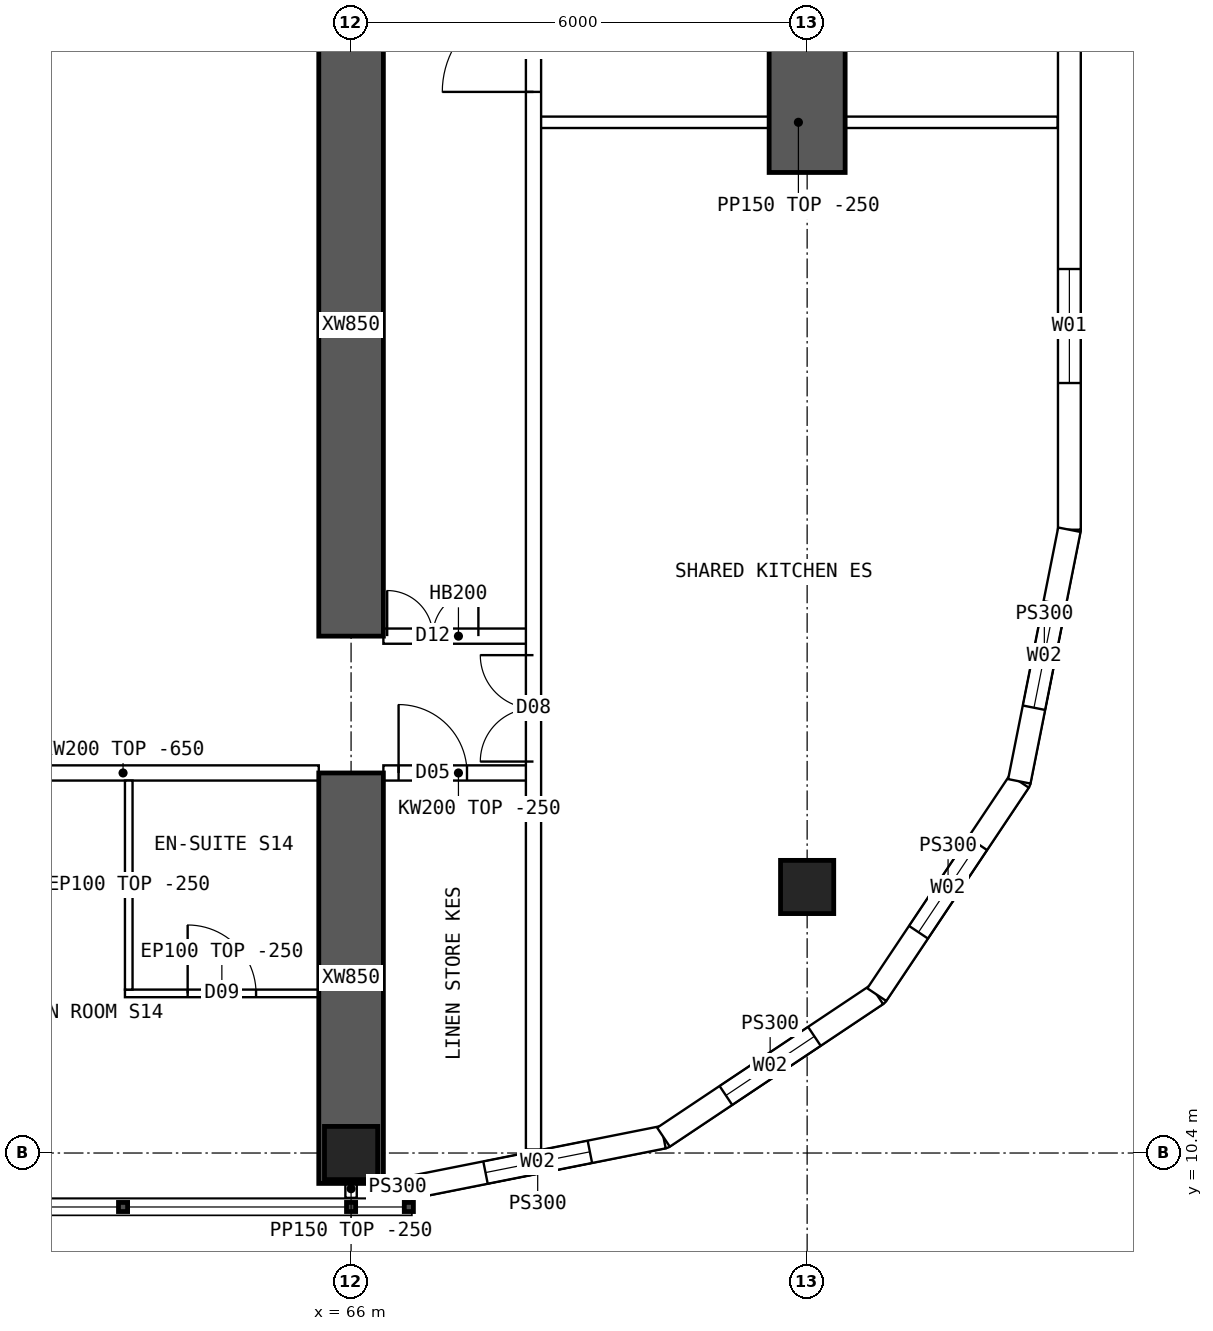
"""IFC4 building model, lengths in metres.
Left out: names, types, materials, properties, quantities, classifications, styles, units other than length and angle.
Written with IfcOpenShell. Run it as: python <this file> out.ifc"""

import sys

from ifc_helpers import new_model, si_unit, direction, frame, frame_2d, origin, origin_2d, place, context, subcontext, project, spatial, polyline, rectangle, hollow_rectangle, outline, extrude, element, fill, save


model = new_model("IFC4")
c1 = context("Model", 3, precision=1e-05, world=origin(), true_north=direction((0.0, 1.0)))
c2 = subcontext(c1, "Body", "Model", "MODEL_VIEW")
j1 = project(units=[si_unit("LENGTHUNIT", "METRE"), si_unit("PLANEANGLEUNIT", "RADIAN")], contexts=[c1])
p1 = place(None, origin())
s1 = spatial("IfcSite", under=j1, at=p1, CompositionType="ELEMENT")
p2 = place(p1, origin())
s2 = spatial("IfcBuilding", under=s1, at=p2, CompositionType="ELEMENT")
p3 = place(p2, frame((0.0, 0.0, 167.35)))
s3 = spatial("IfcBuildingStorey", under=s2, at=p3, CompositionType="ELEMENT", Elevation=167.35)
for number, where, z_axis, x_axis in (
    (1, (66.0, 10.4, 0.0), (0.0, 0.0, 1.0), (1.0, 0.0, 0.0)),
    (2, (72.0, 13.9, 0.0), (0.0, 0.0, 1.0), (1.0, 0.0, 0.0)),
):
    element("IfcColumn", number, at=place(p3, frame(where, z_axis=z_axis, x_axis=x_axis)), inside=s3, PredefinedType="COLUMN", context=c2, shape_type="SweptSolid", body=[
        extrude(hollow_rectangle(XDim=0.7, YDim=0.7, WallThickness=0.07, at=origin_2d()), origin(), (0.0, 0.0, 1.0), 3.75),
    ])
p4 = place(p3, frame((72.0, 23.3, 0.0), z_axis=(0.0, 0.0, 1.0), x_axis=(0.0, 1.0, 0.0)))
e3 = element("IfcWall", 3, at=p4, inside=s3, PredefinedType="SHEAR", context=c2, shape_type="SweptSolid", body=[
    extrude(rectangle(XDim=5.0, YDim=1.0, at=frame_2d((2.5, 0.0))), origin(), (0.0, 0.0, 1.0), 3.75),
])
p5 = place(p3, frame((66.0, 10.0, 0.0), z_axis=(0.0, 0.0, 1.0), x_axis=(0.0, 1.0, 0.0)))
e4 = element("IfcWall", 4, at=p5, inside=s3, PredefinedType="SHEAR", context=c2, shape_type="SweptSolid", body=[
    extrude(rectangle(XDim=5.4, YDim=0.85, at=frame_2d((2.7, 0.0))), origin(), (0.0, 0.0, 1.0), 3.75),
])
p6 = place(p3, frame((66.0, 17.2, 0.0), z_axis=(0.0, 0.0, 1.0), x_axis=(0.0, 1.0, 0.0)))
e5 = element("IfcWall", 5, at=p6, inside=s3, PredefinedType="SHEAR", context=c2, shape_type="SweptSolid", body=[
    extrude(rectangle(XDim=8.175, YDim=0.85, at=frame_2d((4.087, 0.0))), origin(), (0.0, 0.0, 1.0), 3.75),
])
p7 = place(p3, frame((75.45, 18.6, 0.0), z_axis=(0.0, 0.0, 1.0), x_axis=(0.0, 1.0, 0.0)))
e6 = element("IfcWall", 6, at=p7, inside=s3, PredefinedType="SOLIDWALL", context=c2, shape_type="SweptSolid", body=[
    extrude(outline(polyline([(-0.015, -0.15), (26.815, -0.15), (26.785, 0.15), (0.015, 0.15), (-0.015, -0.15)])), origin(), (0.0, 0.0, 1.0), 3.5),
])
p8 = place(p7, frame((1.93, 0.0, 0.9)))
e7 = element("IfcOpeningElement", 7, at=p8, cuts=e6, PredefinedType="OPENING", context=c2, shape_type="SweptSolid", body=[
    extrude(rectangle(XDim=1.5, YDim=2.0, at=frame_2d((0.75, 1.0))), frame((0.0, 0.16, 0.0), z_axis=(0.0, -1.0, 0.0), x_axis=(1.0, 0.0, 0.0)), (0.0, 0.0, 1.0), 0.32),
])
p9 = place(p7, frame((7.29, 0.0, 0.9)))
e8 = element("IfcOpeningElement", 8, at=p9, cuts=e6, PredefinedType="OPENING", context=c2, shape_type="SweptSolid", body=[
    extrude(rectangle(XDim=1.5, YDim=2.0, at=frame_2d((0.75, 1.0))), frame((0.0, 0.16, 0.0), z_axis=(0.0, -1.0, 0.0), x_axis=(1.0, 0.0, 0.0)), (0.0, 0.0, 1.0), 0.32),
])
p10 = place(p7, frame((12.65, 0.0, 0.9)))
e9 = element("IfcOpeningElement", 9, at=p10, cuts=e6, PredefinedType="OPENING", context=c2, shape_type="SweptSolid", body=[
    extrude(rectangle(XDim=1.5, YDim=2.0, at=frame_2d((0.75, 1.0))), frame((0.0, 0.16, 0.0), z_axis=(0.0, -1.0, 0.0), x_axis=(1.0, 0.0, 0.0)), (0.0, 0.0, 1.0), 0.32),
])
p11 = place(p7, frame((18.01, 0.0, 0.9)))
e10 = element("IfcOpeningElement", 10, at=p11, cuts=e6, PredefinedType="OPENING", context=c2, shape_type="SweptSolid", body=[
    extrude(rectangle(XDim=1.5, YDim=2.0, at=frame_2d((0.75, 1.0))), frame((0.0, 0.16, 0.0), z_axis=(0.0, -1.0, 0.0), x_axis=(1.0, 0.0, 0.0)), (0.0, 0.0, 1.0), 0.32),
])
p12 = place(p7, frame((23.37, 0.0, 0.9)))
e11 = element("IfcOpeningElement", 11, at=p12, cuts=e6, PredefinedType="OPENING", context=c2, shape_type="SweptSolid", body=[
    extrude(rectangle(XDim=1.5, YDim=2.0, at=frame_2d((0.75, 1.0))), frame((0.0, 0.16, 0.0), z_axis=(0.0, -1.0, 0.0), x_axis=(1.0, 0.0, 0.0)), (0.0, 0.0, 1.0), 0.32),
])
p13 = place(p3, frame((66.8, 9.95, 0.0), z_axis=(0.0, 0.0, 1.0), x_axis=(0.98078325777, 0.195100490205, 0.0)))
e12 = element("IfcWall", 12, at=p13, inside=s3, PredefinedType="SOLIDWALL", context=c2, shape_type="SweptSolid", body=[
    extrude(outline(polyline([(-0.03, -0.15), (3.405, -0.15), (3.345, 0.15), (0.03, 0.15), (-0.03, -0.15)])), origin(), (0.0, 0.0, 1.0), 3.5),
])
p14 = place(p13, frame((0.988, 0.0, 0.9)))
e13 = element("IfcOpeningElement", 13, at=p14, cuts=e12, PredefinedType="OPENING", context=c2, shape_type="SweptSolid", body=[
    extrude(rectangle(XDim=1.4, YDim=1.8, at=frame_2d((0.7, 0.9))), frame((0.0, 0.16, 0.0), z_axis=(0.0, -1.0, 0.0), x_axis=(1.0, 0.0, 0.0)), (0.0, 0.0, 1.0), 0.32),
])
p15 = place(p3, frame((70.11, 10.608, 0.0), z_axis=(0.0, 0.0, 1.0), x_axis=(0.831493450887, 0.555534554399, 0.0)))
e14 = element("IfcWall", 14, at=p15, inside=s3, PredefinedType="SOLIDWALL", context=c2, shape_type="SweptSolid", body=[
    extrude(outline(polyline([(-0.03, -0.15), (3.405, -0.15), (3.345, 0.15), (0.03, 0.15), (-0.03, -0.15)])), origin(), (0.0, 0.0, 1.0), 3.5),
])
p16 = place(p15, frame((0.988, 0.0, 0.9)))
e15 = element("IfcOpeningElement", 15, at=p16, cuts=e14, PredefinedType="OPENING", context=c2, shape_type="SweptSolid", body=[
    extrude(rectangle(XDim=1.4, YDim=1.8, at=frame_2d((0.7, 0.9))), frame((0.0, 0.16, 0.0), z_axis=(0.0, -1.0, 0.0), x_axis=(1.0, 0.0, 0.0)), (0.0, 0.0, 1.0), 0.32),
])
p17 = place(p3, frame((72.917, 12.483, 0.0), z_axis=(0.0, 0.0, 1.0), x_axis=(0.555534554399, 0.831493450887, 0.0)))
e16 = element("IfcWall", 16, at=p17, inside=s3, PredefinedType="SOLIDWALL", context=c2, shape_type="SweptSolid", body=[
    extrude(outline(polyline([(-0.03, -0.15), (3.405, -0.15), (3.345, 0.15), (0.03, 0.15), (-0.03, -0.15)])), origin(), (0.0, 0.0, 1.0), 3.5),
])
p18 = place(p17, frame((0.988, 0.0, 0.9)))
e17 = element("IfcOpeningElement", 17, at=p18, cuts=e16, PredefinedType="OPENING", context=c2, shape_type="SweptSolid", body=[
    extrude(rectangle(XDim=1.4, YDim=1.8, at=frame_2d((0.7, 0.9))), frame((0.0, 0.16, 0.0), z_axis=(0.0, -1.0, 0.0), x_axis=(1.0, 0.0, 0.0)), (0.0, 0.0, 1.0), 0.32),
])
p19 = place(p3, frame((74.792, 15.29, 0.0), z_axis=(0.0, 0.0, 1.0), x_axis=(0.19508664885, 0.980786011034, 0.0)))
e18 = element("IfcWall", 18, at=p19, inside=s3, PredefinedType="SOLIDWALL", context=c2, shape_type="SweptSolid", body=[
    extrude(outline(polyline([(-0.03, -0.15), (3.39, -0.15), (3.36, 0.15), (0.03, 0.15), (-0.03, -0.15)])), origin(), (0.0, 0.0, 1.0), 3.5),
])
p20 = place(p19, frame((0.988, 0.0, 0.9)))
e19 = element("IfcOpeningElement", 19, at=p20, cuts=e18, PredefinedType="OPENING", context=c2, shape_type="SweptSolid", body=[
    extrude(rectangle(XDim=1.4, YDim=1.8, at=frame_2d((0.7, 0.9))), frame((0.0, 0.16, 0.0), z_axis=(0.0, -1.0, 0.0), x_axis=(1.0, 0.0, 0.0)), (0.0, 0.0, 1.0), 0.32),
])
p21 = place(p3, frame((66.8, 9.95, 0.0), z_axis=(0.0, 0.0, 1.0), x_axis=(-1.0, 0.0, 0.0)))
e20 = element("IfcWall", 20, at=p21, inside=s3, PredefinedType="SOLIDWALL", context=c2, shape_type="SweptSolid", body=[
    extrude(rectangle(XDim=0.375, YDim=0.3, at=frame_2d((0.188, 0.0))), origin(), (0.0, 0.0, 1.0), 3.5),
])
p22 = place(p3, frame((60.425, 15.4, 0.0), z_axis=(0.0, 0.0, 1.0), x_axis=(1.0, 0.0, 0.0)))
e21 = element("IfcWall", 21, at=p22, inside=s3, PredefinedType="SOLIDWALL", context=c2, shape_type="SweptSolid", body=[
    extrude(outline(polyline([(0.0, 0.0), (5.15, 0.0), (5.15, 3.1), (0.0, 3.1), (0.0, 0.0)])), frame((0.0, 0.1, 0.0), z_axis=(0.0, -1.0, 0.0), x_axis=(1.0, 0.0, 0.0)), (0.0, 0.0, 1.0), 0.2),
])
p23 = place(p22, frame((0.1, 0.0, 0.0)))
e22 = element("IfcOpeningElement", 22, at=p23, cuts=e21, PredefinedType="OPENING", context=c2, shape_type="SweptSolid", body=[
    extrude(rectangle(XDim=0.9, YDim=2.1, at=frame_2d((0.45, 1.05))), frame((0.0, 0.11, 0.0), z_axis=(0.0, -1.0, 0.0), x_axis=(1.0, 0.0, 0.0)), (0.0, 0.0, 1.0), 0.22),
])
p24 = place(p3, frame((66.425, 15.4, 0.0), z_axis=(0.0, 0.0, 1.0), x_axis=(1.0, 0.0, 0.0)))
e23 = element("IfcWall", 23, at=p24, inside=s3, PredefinedType="SOLIDWALL", context=c2, shape_type="SweptSolid", body=[
    extrude(rectangle(XDim=1.975, YDim=0.2, at=frame_2d((0.987, 0.0))), origin(), (0.0, 0.0, 1.0), 3.5),
])
p25 = place(p24, frame((0.2, 0.0, 0.0)))
e24 = element("IfcOpeningElement", 24, at=p25, cuts=e23, PredefinedType="OPENING", context=c2, shape_type="SweptSolid", body=[
    extrude(rectangle(XDim=0.9, YDim=2.1, at=frame_2d((0.45, 1.05))), frame((0.0, 0.11, 0.0), z_axis=(0.0, -1.0, 0.0), x_axis=(1.0, 0.0, 0.0)), (0.0, 0.0, 1.0), 0.22),
])
p26 = place(p3, frame((66.425, 17.2, 0.0), z_axis=(0.0, 0.0, 1.0), x_axis=(1.0, 0.0, 0.0)))
e25 = element("IfcWall", 25, at=p26, inside=s3, PredefinedType="SOLIDWALL", context=c2, shape_type="SweptSolid", body=[
    extrude(rectangle(XDim=1.975, YDim=0.2, at=frame_2d((0.987, 0.0))), origin(), (0.0, 0.0, 1.0), 3.5),
])
p27 = place(p26, frame((0.05, 0.0, 0.0)))
e26 = element("IfcOpeningElement", 26, at=p27, cuts=e25, PredefinedType="OPENING", context=c2, shape_type="SweptSolid", body=[
    extrude(rectangle(XDim=1.2, YDim=2.1, at=frame_2d((0.6, 1.05))), frame((0.0, 0.11, 0.0), z_axis=(0.0, -1.0, 0.0), x_axis=(1.0, 0.0, 0.0)), (0.0, 0.0, 1.0), 0.22),
])
p28 = place(p3, frame((65.575, 12.5, 0.0), z_axis=(0.0, 0.0, 1.0), x_axis=(-1.0, 0.0, 0.0)))
e27 = element("IfcWall", 27, at=p28, inside=s3, PredefinedType="PARTITIONING", context=c2, shape_type="SweptSolid", body=[
    extrude(rectangle(XDim=2.55, YDim=0.1, at=frame_2d((1.275, 0.0))), origin(), (0.0, 0.0, 1.0), 3.5),
])
p29 = place(p28, frame((0.825, 0.0, 0.0)))
e28 = element("IfcOpeningElement", 28, at=p29, cuts=e27, PredefinedType="OPENING", context=c2, shape_type="SweptSolid", body=[
    extrude(rectangle(XDim=0.9, YDim=2.1, at=frame_2d((0.45, 1.05))), frame((0.0, 0.06, 0.0), z_axis=(0.0, -1.0, 0.0), x_axis=(1.0, 0.0, 0.0)), (0.0, 0.0, 1.0), 0.12),
])
p30 = place(p3, frame((63.075, 12.55, 0.0), z_axis=(0.0, 0.0, 1.0), x_axis=(0.0, 1.0, 0.0)))
e29 = element("IfcWall", 29, at=p30, inside=s3, PredefinedType="PARTITIONING", context=c2, shape_type="SweptSolid", body=[
    extrude(outline(polyline([(0.0, 0.0), (2.75, 0.0), (2.75, 3.1), (2.702, 3.1), (2.7, 3.5), (0.0, 3.5), (0.0, 0.0)])), frame((0.0, 0.05, 0.0), z_axis=(0.0, -1.0, 0.0), x_axis=(1.0, 0.0, 0.0)), (0.0, 0.0, 1.0), 0.1),
])
p31 = place(p3, frame((68.4, 10.446, 0.0), z_axis=(0.0, 0.0, 1.0), x_axis=(0.0, 1.0, 0.0)))
e30 = element("IfcWall", 30, at=p31, inside=s3, PredefinedType="SOLIDWALL", context=c2, shape_type="SweptSolid", body=[
    extrude(rectangle(XDim=43.107, YDim=0.2, at=frame_2d((21.554, 0.0))), origin(), (0.0, 0.0, 1.0), 3.5),
])
p32 = place(p31, frame((13.914, 0.0, 0.0)))
e31 = element("IfcOpeningElement", 31, at=p32, cuts=e30, PredefinedType="OPENING", context=c2, shape_type="SweptSolid", body=[
    extrude(rectangle(XDim=1.2, YDim=2.1, at=frame_2d((0.6, 1.05))), frame((0.0, 0.11, 0.0), z_axis=(0.0, -1.0, 0.0), x_axis=(1.0, 0.0, 0.0)), (0.0, 0.0, 1.0), 0.22),
])
p33 = place(p31, frame((22.634, 0.0, 0.0)))
e32 = element("IfcOpeningElement", 32, at=p33, cuts=e30, PredefinedType="OPENING", context=c2, shape_type="SweptSolid", body=[
    extrude(rectangle(XDim=1.2, YDim=2.1, at=frame_2d((0.6, 1.05))), frame((0.0, 0.11, 0.0), z_axis=(0.0, -1.0, 0.0), x_axis=(1.0, 0.0, 0.0)), (0.0, 0.0, 1.0), 0.22),
])
p34 = place(p31, frame((5.104, 0.0, 0.0)))
e33 = element("IfcOpeningElement", 33, at=p34, cuts=e30, PredefinedType="OPENING", context=c2, shape_type="SweptSolid", body=[
    extrude(rectangle(XDim=1.4, YDim=2.1, at=frame_2d((0.7, 1.05))), frame((0.0, 0.11, 0.0), z_axis=(0.0, -1.0, 0.0), x_axis=(1.0, 0.0, 0.0)), (0.0, 0.0, 1.0), 0.22),
])
p35 = place(p31, frame((36.504, 0.0, 0.0)))
e34 = element("IfcOpeningElement", 34, at=p35, cuts=e30, PredefinedType="OPENING", context=c2, shape_type="SweptSolid", body=[
    extrude(rectangle(XDim=1.4, YDim=2.1, at=frame_2d((0.7, 1.05))), frame((0.0, 0.11, 0.0), z_axis=(0.0, -1.0, 0.0), x_axis=(1.0, 0.0, 0.0)), (0.0, 0.0, 1.0), 0.22),
])
p36 = place(p3, frame((68.475, 23.96, 0.0), z_axis=(0.0, 0.0, 1.0), x_axis=(1.0, 0.0, 0.0)))
e35 = element("IfcWall", 35, at=p36, inside=s3, PredefinedType="PARTITIONING", context=c2, shape_type="SweptSolid", body=[
    extrude(rectangle(XDim=6.82, YDim=0.15, at=frame_2d((3.41, 0.0))), origin(), (0.0, 0.0, 1.0), 3.5),
])
p37 = place(p3, frame((66.0, 10.05, 0.0), z_axis=(0.0, 0.0, 1.0), x_axis=(0.0, -1.0, 0.0)))
e36 = element("IfcWall", 36, at=p37, inside=s3, PredefinedType="PARTITIONING", context=c2, shape_type="SweptSolid", body=[
    extrude(rectangle(XDim=0.24, YDim=0.15, at=frame_2d((0.12, 0.0))), origin(), (0.0, 0.0, 1.0), 3.5),
])
p38 = place(p8, origin())
e37 = element("IfcWindow", 37, at=p38, inside=s3, PartitioningType="SINGLE_PANEL", PredefinedType="WINDOW", context=c2, shape_type="SweptSolid", body=[
    extrude(rectangle(XDim=1.5, YDim=2.0, at=frame_2d((0.75, 1.0))), frame((0.0, 0.03, 0.0), z_axis=(0.0, -1.0, 0.0), x_axis=(1.0, 0.0, 0.0)), (0.0, 0.0, 1.0), 0.06),
])
fill(e7, e37)
p39 = place(p14, origin())
e38 = element("IfcWindow", 38, at=p39, inside=s3, PartitioningType="SINGLE_PANEL", PredefinedType="WINDOW", context=c2, shape_type="SweptSolid", body=[
    extrude(rectangle(XDim=1.4, YDim=1.8, at=frame_2d((0.7, 0.9))), frame((0.0, 0.03, 0.0), z_axis=(0.0, -1.0, 0.0), x_axis=(1.0, 0.0, 0.0)), (0.0, 0.0, 1.0), 0.06),
])
fill(e13, e38)
p40 = place(p16, origin())
e39 = element("IfcWindow", 39, at=p40, inside=s3, PartitioningType="SINGLE_PANEL", PredefinedType="WINDOW", context=c2, shape_type="SweptSolid", body=[
    extrude(rectangle(XDim=1.4, YDim=1.8, at=frame_2d((0.7, 0.9))), frame((0.0, 0.03, 0.0), z_axis=(0.0, -1.0, 0.0), x_axis=(1.0, 0.0, 0.0)), (0.0, 0.0, 1.0), 0.06),
])
fill(e15, e39)
p41 = place(p18, origin())
e40 = element("IfcWindow", 40, at=p41, inside=s3, PartitioningType="SINGLE_PANEL", PredefinedType="WINDOW", context=c2, shape_type="SweptSolid", body=[
    extrude(rectangle(XDim=1.4, YDim=1.8, at=frame_2d((0.7, 0.9))), frame((0.0, 0.03, 0.0), z_axis=(0.0, -1.0, 0.0), x_axis=(1.0, 0.0, 0.0)), (0.0, 0.0, 1.0), 0.06),
])
fill(e17, e40)
p42 = place(p20, origin())
e41 = element("IfcWindow", 41, at=p42, inside=s3, PartitioningType="SINGLE_PANEL", PredefinedType="WINDOW", context=c2, shape_type="SweptSolid", body=[
    extrude(rectangle(XDim=1.4, YDim=1.8, at=frame_2d((0.7, 0.9))), frame((0.0, 0.03, 0.0), z_axis=(0.0, -1.0, 0.0), x_axis=(1.0, 0.0, 0.0)), (0.0, 0.0, 1.0), 0.06),
])
fill(e19, e41)
p43 = place(p27, origin())
e42 = element("IfcDoor", 42, at=p43, inside=s3, OperationType="DOUBLE_DOOR_SINGLE_SWING", PredefinedType="DOOR", context=c2, shape_type="SweptSolid", body=[
    extrude(rectangle(XDim=1.2, YDim=2.1, at=frame_2d((0.6, 1.05))), frame((0.0, 0.025, 0.0), z_axis=(0.0, -1.0, 0.0), x_axis=(1.0, 0.0, 0.0)), (0.0, 0.0, 1.0), 0.05),
])
fill(e26, e42)
p44 = place(p29, origin())
e43 = element("IfcDoor", 43, at=p44, inside=s3, OperationType="SINGLE_SWING_RIGHT", PredefinedType="DOOR", context=c2, shape_type="SweptSolid", body=[
    extrude(rectangle(XDim=0.9, YDim=2.1, at=frame_2d((0.45, 1.05))), frame((0.0, 0.025, 0.0), z_axis=(0.0, -1.0, 0.0), x_axis=(1.0, 0.0, 0.0)), (0.0, 0.0, 1.0), 0.05),
])
fill(e28, e43)
p45 = place(p32, origin())
e44 = element("IfcDoor", 44, at=p45, inside=s3, OperationType="SINGLE_SWING_LEFT", PredefinedType="DOOR", context=c2, shape_type="SweptSolid", body=[
    extrude(rectangle(XDim=1.2, YDim=2.1, at=frame_2d((0.6, 1.05))), frame((0.0, 0.025, 0.0), z_axis=(0.0, -1.0, 0.0), x_axis=(1.0, 0.0, 0.0)), (0.0, 0.0, 1.0), 0.05),
])
fill(e31, e44)
p46 = place(p34, origin())
e45 = element("IfcDoor", 45, at=p46, inside=s3, OperationType="DOUBLE_DOOR_SINGLE_SWING", PredefinedType="DOOR", context=c2, shape_type="SweptSolid", body=[
    extrude(rectangle(XDim=1.4, YDim=2.1, at=frame_2d((0.7, 1.05))), frame((0.0, 0.025, 0.0), z_axis=(0.0, -1.0, 0.0), x_axis=(1.0, 0.0, 0.0)), (0.0, 0.0, 1.0), 0.05),
])
fill(e33, e45)
p47 = place(p25, origin())
e46 = element("IfcDoor", 46, at=p47, inside=s3, OperationType="SINGLE_SWING_LEFT", PredefinedType="DOOR", context=c2, shape_type="SweptSolid", body=[
    extrude(rectangle(XDim=0.9, YDim=2.1, at=frame_2d((0.45, 1.05))), frame((0.0, 0.025, 0.0), z_axis=(0.0, -1.0, 0.0), x_axis=(1.0, 0.0, 0.0)), (0.0, 0.0, 1.0), 0.05),
])
fill(e24, e46)
save(model, sys.argv[1])
